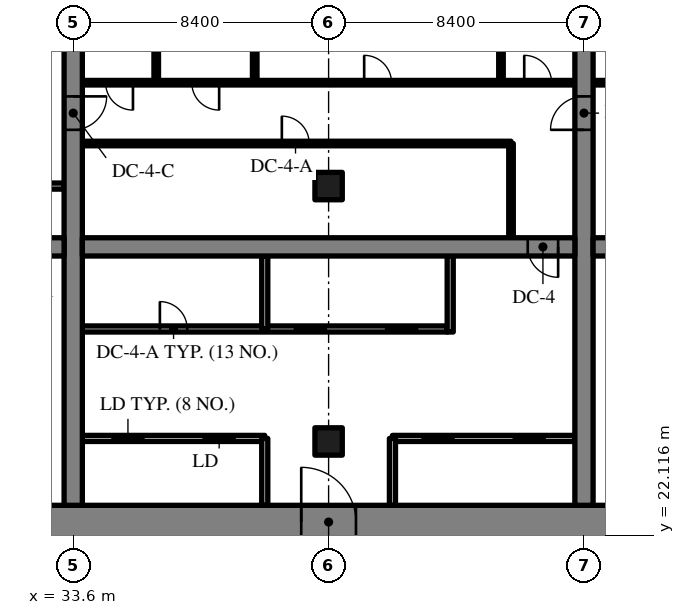
"""IFC4 building model, lengths in metres.
Left out: names, types, materials, properties, quantities, classifications, styles, units other than length and angle.
Written with IfcOpenShell. Run it as: python <this file> out.ifc"""

import sys

from ifc_helpers import new_model, si_unit, direction, frame, frame_2d, origin, origin_2d, place, context, subcontext, project, spatial, rectangle, extrude, source, transform, mapped, element, fill, save


model = new_model("IFC4")
c1 = context("Model", 3, precision=1e-05, world=origin(), true_north=direction((0.0, 1.0)))
c2 = subcontext(c1, "Body", "Model", "MODEL_VIEW")
j1 = project(units=[si_unit("LENGTHUNIT", "METRE"), si_unit("PLANEANGLEUNIT", "RADIAN")], contexts=[c1])
p1 = place(None, origin())
s1 = spatial("IfcSite", under=j1, at=p1, CompositionType="ELEMENT")
p2 = place(p1, origin())
s2 = spatial("IfcBuilding", under=s1, at=p2, CompositionType="ELEMENT")
p3 = place(p2, frame((0.0, 0.0, -9.0)))
s3 = spatial("IfcBuildingStorey", under=s2, at=p3, CompositionType="ELEMENT", Elevation=-9.0)
m1 = source(origin(), c2, "Body", "SweptSolid", [
    extrude(rectangle(XDim=50.4, YDim=1.1, at=frame_2d((25.2, 0.0))), origin(), (0.0, 0.0, 1.0), 4.22),
])
p4 = place(p3, frame((25.2, 22.55, 0.0), z_axis=(0.0, 0.0, 1.0), x_axis=(1.0, 0.0, 0.0)))
e1 = element("IfcWall", 1, at=p4, inside=s3, PredefinedType="SHEAR", context=c2, shape_type="MappedRepresentation", body=[
    mapped(m1, transform((0.0, 0.0, 0.0), scale=1.0)),
])
m2 = source(origin(), c2, "Body", "SweptSolid", [
    extrude(rectangle(XDim=1.8, YDim=2.1, at=frame_2d((0.9, 1.05))), frame((0.0, 0.56, 0.0), z_axis=(0.0, -1.0, 0.0), x_axis=(1.0, 0.0, 0.0)), (0.0, 0.0, 1.0), 1.12),
])
p5 = place(p4, frame((15.9, 0.0, 0.0)))
e2 = element("IfcOpeningElement", 2, at=p5, cuts=e1, PredefinedType="OPENING", context=c2, shape_type="MappedRepresentation", body=[
    mapped(m2, transform((0.0, 0.0, 0.0), scale=1.0)),
])
m3 = source(origin(), c2, "Body", "SweptSolid", [
    extrude(rectangle(XDim=1.2, YDim=2.1, at=frame_2d((0.6, 1.05))), frame((0.0, 0.56, 0.0), z_axis=(0.0, -1.0, 0.0), x_axis=(1.0, 0.0, 0.0)), (0.0, 0.0, 1.0), 1.12),
])
p6 = place(p4, frame((27.0, 0.0, 0.0)))
e3 = element("IfcOpeningElement", 3, at=p6, cuts=e1, PredefinedType="OPENING", context=c2, shape_type="MappedRepresentation", body=[
    mapped(m3, transform((0.0, 0.0, 0.0), scale=1.0)),
])
m4 = source(origin(), c2, "Body", "SweptSolid", [
    extrude(rectangle(XDim=0.9, YDim=2.1, at=frame_2d((0.45, 1.05))), frame((0.0, 0.56, 0.0), z_axis=(0.0, -1.0, 0.0), x_axis=(1.0, 0.0, 0.0)), (0.0, 0.0, 1.0), 1.12),
])
p7 = place(p4, frame((33.75, 0.0, 0.0)))
e4 = element("IfcOpeningElement", 4, at=p7, cuts=e1, PredefinedType="OPENING", context=c2, shape_type="MappedRepresentation", body=[
    mapped(m4, transform((0.0, 0.0, 0.0), scale=1.0)),
])
p8 = place(p4, frame((30.75, 0.0, 0.0)))
e5 = element("IfcOpeningElement", 5, at=p8, cuts=e1, PredefinedType="OPENING", context=c2, shape_type="MappedRepresentation", body=[
    mapped(m4, transform((0.0, 0.0, 0.0), scale=1.0)),
])
p9 = place(p4, frame((38.25, 0.0, 0.0)))
e6 = element("IfcOpeningElement", 6, at=p9, cuts=e1, PredefinedType="OPENING", context=c2, shape_type="MappedRepresentation", body=[
    mapped(m4, transform((0.0, 0.0, 0.0), scale=1.0)),
])
p10 = place(p4, frame((6.425, 0.0, 0.0)))
e7 = element("IfcOpeningElement", 7, at=p10, cuts=e1, PredefinedType="OPENING", context=c2, shape_type="MappedRepresentation", body=[
    mapped(m3, transform((0.0, 0.0, 0.0), scale=1.0)),
])
p11 = place(p4, frame((47.675, 0.0, 0.0)))
e8 = element("IfcOpeningElement", 8, at=p11, cuts=e1, PredefinedType="OPENING", context=c2, shape_type="MappedRepresentation", body=[
    mapped(m3, transform((0.0, 0.0, 0.0), scale=1.0)),
])
m5 = source(origin(), c2, "Body", "SweptSolid", [
    extrude(rectangle(XDim=17.8, YDim=0.6, at=frame_2d((8.9, 0.0))), origin(), (0.0, 0.0, 1.0), 4.22),
])
p12 = place(p3, frame((33.6, 23.1, 0.0), z_axis=(0.0, 0.0, 1.0), x_axis=(0.0, 1.0, 0.0)))
e9 = element("IfcWall", 9, at=p12, inside=s3, PredefinedType="SHEAR", context=c2, shape_type="MappedRepresentation", body=[
    mapped(m5, transform((0.0, 0.0, 0.0), scale=1.0)),
])
m6 = source(origin(), c2, "Body", "SweptSolid", [
    extrude(rectangle(XDim=1.1, YDim=2.1, at=frame_2d((0.55, 1.05))), frame((0.0, 0.31, 0.0), z_axis=(0.0, -1.0, 0.0), x_axis=(1.0, 0.0, 0.0)), (0.0, 0.0, 1.0), 0.62),
])
p13 = place(p12, frame((12.35, 0.0, 0.0)))
e10 = element("IfcOpeningElement", 10, at=p13, cuts=e9, PredefinedType="OPENING", context=c2, shape_type="MappedRepresentation", body=[
    mapped(m6, transform((0.0, 0.0, 0.0), scale=1.0)),
])
p14 = place(p3, frame((50.4, 23.1, 0.0), z_axis=(0.0, 0.0, 1.0), x_axis=(0.0, 1.0, 0.0)))
e11 = element("IfcWall", 11, at=p14, inside=s3, PredefinedType="SHEAR", context=c2, shape_type="MappedRepresentation", body=[
    mapped(m5, transform((0.0, 0.0, 0.0), scale=1.0)),
])
p15 = place(p14, frame((12.35, 0.0, 0.0)))
e12 = element("IfcOpeningElement", 12, at=p15, cuts=e11, PredefinedType="OPENING", context=c2, shape_type="MappedRepresentation", body=[
    mapped(m6, transform((0.0, 0.0, 0.0), scale=1.0)),
])
m7 = source(origin(), c2, "Body", "SweptSolid", [
    extrude(rectangle(XDim=7.0, YDim=0.6, at=frame_2d((3.5, 0.0))), origin(), (0.0, 0.0, 1.0), 4.22),
])
p16 = place(p3, frame((26.3, 31.6, 0.0), z_axis=(0.0, 0.0, 1.0), x_axis=(1.0, 0.0, 0.0)))
e13 = element("IfcWall", 13, at=p16, inside=s3, PredefinedType="SHEAR", context=c2, shape_type="MappedRepresentation", body=[
    mapped(m7, transform((0.0, 0.0, 0.0), scale=1.0)),
])
p17 = place(p16, frame((5.375, 0.0, 0.0)))
e14 = element("IfcOpeningElement", 14, at=p17, cuts=e13, PredefinedType="OPENING", context=c2, shape_type="MappedRepresentation", body=[
    mapped(m6, transform((0.0, 0.0, 0.0), scale=1.0)),
])
m8 = source(origin(), c2, "Body", "SweptSolid", [
    extrude(rectangle(XDim=16.2, YDim=0.6, at=frame_2d((8.1, 0.0))), origin(), (0.0, 0.0, 1.0), 4.22),
])
p18 = place(p3, frame((33.9, 31.6, 0.0), z_axis=(0.0, 0.0, 1.0), x_axis=(1.0, 0.0, 0.0)))
e15 = element("IfcWall", 15, at=p18, inside=s3, PredefinedType="SHEAR", context=c2, shape_type="MappedRepresentation", body=[
    mapped(m8, transform((0.0, 0.0, 0.0), scale=1.0)),
])
m9 = source(origin(), c2, "Body", "SweptSolid", [
    extrude(rectangle(XDim=1.0, YDim=2.1, at=frame_2d((0.5, 1.05))), frame((0.0, 0.31, 0.0), z_axis=(0.0, -1.0, 0.0), x_axis=(1.0, 0.0, 0.0)), (0.0, 0.0, 1.0), 0.62),
])
p19 = place(p18, frame((14.65, 0.0, 0.0)))
e16 = element("IfcOpeningElement", 16, at=p19, cuts=e15, PredefinedType="OPENING", context=c2, shape_type="MappedRepresentation", body=[
    mapped(m9, transform((0.0, 0.0, 0.0), scale=1.0)),
])
m10 = source(origin(), c2, "Body", "SweptSolid", [
    extrude(rectangle(XDim=16.2, YDim=0.6, at=frame_2d((8.1, 0.0))), origin(), (0.0, 0.0, 1.0), 4.22),
])
p20 = place(p3, frame((50.7, 31.6, 0.0), z_axis=(0.0, 0.0, 1.0), x_axis=(1.0, 0.0, 0.0)))
e17 = element("IfcWall", 17, at=p20, inside=s3, PredefinedType="SHEAR", context=c2, shape_type="MappedRepresentation", body=[
    mapped(m10, transform((0.0, 0.0, 0.0), scale=1.0)),
])
p21 = place(p20, frame((0.55, 0.0, 0.0)))
e18 = element("IfcOpeningElement", 18, at=p21, cuts=e17, PredefinedType="OPENING", context=c2, shape_type="MappedRepresentation", body=[
    mapped(m9, transform((0.0, 0.0, 0.0), scale=1.0)),
])
m11 = source(origin(), c2, "Body", "SweptSolid", [
    extrude(rectangle(XDim=0.9, YDim=0.9, at=origin_2d()), origin(), (0.0, 0.0, 1.0), 4.22),
])
for number, where, z_axis, x_axis in (
    (19, (42.0, 25.2, 0.0), (0.0, 0.0, 1.0), (1.0, 0.0, 0.0)),
    (20, (42.0, 33.6, 0.0), (0.0, 0.0, 1.0), (1.0, 0.0, 0.0)),
):
    element("IfcColumn", number, at=place(p3, frame(where, z_axis=z_axis, x_axis=x_axis)), inside=s3, PredefinedType="COLUMN", context=c2, shape_type="MappedRepresentation", body=[
        mapped(m11, transform((0.0, 0.0, 0.0), scale=1.0)),
    ])
m12 = source(origin(), c2, "Body", "SweptSolid", [
    extrude(rectangle(XDim=6.0, YDim=0.2, at=frame_2d((3.0, 0.0))), origin(), (0.0, 0.0, 1.0), 4.22),
])
p22 = place(p3, frame((33.9, 25.3, 0.0), z_axis=(0.0, 0.0, 1.0), x_axis=(1.0, 0.0, 0.0)))
e21 = element("IfcWall", 21, at=p22, inside=s3, PredefinedType="SOLIDWALL", context=c2, shape_type="MappedRepresentation", body=[
    mapped(m12, transform((0.0, 0.0, 0.0), scale=1.0)),
])
m13 = source(origin(), c2, "Body", "SweptSolid", [
    extrude(rectangle(XDim=1.1, YDim=2.1, at=frame_2d((0.55, 1.05))), frame((0.0, 0.11, 0.0), z_axis=(0.0, -1.0, 0.0), x_axis=(1.0, 0.0, 0.0)), (0.0, 0.0, 1.0), 0.22),
])
p23 = place(p22, frame((0.95, 0.0, 0.0)))
e22 = element("IfcOpeningElement", 22, at=p23, cuts=e21, PredefinedType="OPENING", context=c2, shape_type="MappedRepresentation", body=[
    mapped(m13, transform((0.0, 0.0, 0.0), scale=1.0)),
])
p24 = place(p22, frame((3.95, 0.0, 0.0)))
e23 = element("IfcOpeningElement", 23, at=p24, cuts=e21, PredefinedType="OPENING", context=c2, shape_type="MappedRepresentation", body=[
    mapped(m13, transform((0.0, 0.0, 0.0), scale=1.0)),
])
p25 = place(p3, frame((44.1, 25.3, 0.0), z_axis=(0.0, 0.0, 1.0), x_axis=(1.0, 0.0, 0.0)))
e24 = element("IfcWall", 24, at=p25, inside=s3, PredefinedType="SOLIDWALL", context=c2, shape_type="MappedRepresentation", body=[
    mapped(m12, transform((0.0, 0.0, 0.0), scale=1.0)),
])
p26 = place(p25, frame((0.95, 0.0, 0.0)))
e25 = element("IfcOpeningElement", 25, at=p26, cuts=e24, PredefinedType="OPENING", context=c2, shape_type="MappedRepresentation", body=[
    mapped(m13, transform((0.0, 0.0, 0.0), scale=1.0)),
])
p27 = place(p25, frame((3.95, 0.0, 0.0)))
e26 = element("IfcOpeningElement", 26, at=p27, cuts=e24, PredefinedType="OPENING", context=c2, shape_type="MappedRepresentation", body=[
    mapped(m13, transform((0.0, 0.0, 0.0), scale=1.0)),
])
m14 = source(origin(), c2, "Body", "SweptSolid", [
    extrude(rectangle(XDim=12.0, YDim=0.2, at=frame_2d((6.0, 0.0))), origin(), (0.0, 0.0, 1.0), 4.22),
])
p28 = place(p3, frame((33.9, 28.9, 0.0), z_axis=(0.0, 0.0, 1.0), x_axis=(1.0, 0.0, 0.0)))
e27 = element("IfcWall", 27, at=p28, inside=s3, PredefinedType="SOLIDWALL", context=c2, shape_type="MappedRepresentation", body=[
    mapped(m14, transform((0.0, 0.0, 0.0), scale=1.0)),
])
p29 = place(p28, frame((6.95, 0.0, 0.0)))
e28 = element("IfcOpeningElement", 28, at=p29, cuts=e27, PredefinedType="OPENING", context=c2, shape_type="MappedRepresentation", body=[
    mapped(m13, transform((0.0, 0.0, 0.0), scale=1.0)),
])
p30 = place(p28, frame((9.95, 0.0, 0.0)))
e29 = element("IfcOpeningElement", 29, at=p30, cuts=e27, PredefinedType="OPENING", context=c2, shape_type="MappedRepresentation", body=[
    mapped(m13, transform((0.0, 0.0, 0.0), scale=1.0)),
])
m15 = source(origin(), c2, "Body", "SweptSolid", [
    extrude(rectangle(XDim=0.9, YDim=2.1, at=frame_2d((0.45, 1.05))), frame((0.0, 0.11, 0.0), z_axis=(0.0, -1.0, 0.0), x_axis=(1.0, 0.0, 0.0)), (0.0, 0.0, 1.0), 0.22),
])
p31 = place(p28, frame((2.55, 0.0, 0.0)))
e30 = element("IfcOpeningElement", 30, at=p31, cuts=e27, PredefinedType="OPENING", context=c2, shape_type="MappedRepresentation", body=[
    mapped(m15, transform((0.0, 0.0, 0.0), scale=1.0)),
])
m16 = source(origin(), c2, "Body", "SweptSolid", [
    extrude(rectangle(XDim=2.2, YDim=0.2, at=frame_2d((1.1, 0.0))), origin(), (0.0, 0.0, 1.0), 4.22),
])
for number, where, z_axis, x_axis in (
    (31, (39.9, 23.1, 0.0), (0.0, 0.0, 1.0), (0.0, 1.0, 0.0)),
    (32, (44.1, 23.1, 0.0), (0.0, 0.0, 1.0), (0.0, 1.0, 0.0)),
):
    element("IfcWall", number, at=place(p3, frame(where, z_axis=z_axis, x_axis=x_axis)), inside=s3, PredefinedType="SOLIDWALL", context=c2, shape_type="MappedRepresentation", body=[
        mapped(m16, transform((0.0, 0.0, 0.0), scale=1.0)),
    ])
m17 = source(origin(), c2, "Body", "SweptSolid", [
    extrude(rectangle(XDim=2.5, YDim=0.2, at=frame_2d((1.25, 0.0))), origin(), (0.0, 0.0, 1.0), 4.22),
])
p32 = place(p3, frame((46.0, 28.8, 0.0), z_axis=(0.0, 0.0, 1.0), x_axis=(0.0, 1.0, 0.0)))
e33 = element("IfcWall", 33, at=p32, inside=s3, PredefinedType="SOLIDWALL", context=c2, shape_type="MappedRepresentation", body=[
    mapped(m17, transform((0.0, 0.0, 0.0), scale=1.0)),
])
m18 = source(origin(), c2, "Body", "SweptSolid", [
    extrude(rectangle(XDim=2.4, YDim=0.2, at=frame_2d((1.2, 0.0))), origin(), (0.0, 0.0, 1.0), 4.22),
])
p33 = place(p3, frame((39.9, 28.9, 0.0), z_axis=(0.0, 0.0, 1.0), x_axis=(0.0, 1.0, 0.0)))
e34 = element("IfcWall", 34, at=p33, inside=s3, PredefinedType="PARTITIONING", context=c2, shape_type="MappedRepresentation", body=[
    mapped(m18, transform((0.0, 0.0, 0.0), scale=1.0)),
])
m19 = source(origin(), c2, "Body", "SweptSolid", [
    extrude(rectangle(XDim=3.1, YDim=0.15, at=frame_2d((1.55, 0.0))), origin(), (0.0, 0.0, 1.0), 4.22),
])
p34 = place(p3, frame((48.0, 31.9, 0.0), z_axis=(0.0, 0.0, 1.0), x_axis=(0.0, 1.0, 0.0)))
e35 = element("IfcWall", 35, at=p34, inside=s3, PredefinedType="PARTITIONING", context=c2, shape_type="MappedRepresentation", body=[
    mapped(m19, transform((0.0, 0.0, 0.0), scale=1.0)),
])
m20 = source(origin(), c2, "Body", "SweptSolid", [
    extrude(rectangle(XDim=14.1, YDim=0.15, at=frame_2d((7.05, 0.0))), origin(), (0.0, 0.0, 1.0), 4.22),
])
p35 = place(p3, frame((33.9, 35.0, 0.0), z_axis=(0.0, 0.0, 1.0), x_axis=(1.0, 0.0, 0.0)))
e36 = element("IfcWall", 36, at=p35, inside=s3, PredefinedType="PARTITIONING", context=c2, shape_type="MappedRepresentation", body=[
    mapped(m20, transform((0.0, 0.0, 0.0), scale=1.0)),
])
m21 = source(origin(), c2, "Body", "SweptSolid", [
    extrude(rectangle(XDim=0.9, YDim=2.1, at=frame_2d((0.45, 1.05))), frame((0.0, 0.085, 0.0), z_axis=(0.0, -1.0, 0.0), x_axis=(1.0, 0.0, 0.0)), (0.0, 0.0, 1.0), 0.17),
])
p36 = place(p35, frame((6.562, 0.0, 0.0)))
e37 = element("IfcOpeningElement", 37, at=p36, cuts=e36, PredefinedType="OPENING", context=c2, shape_type="MappedRepresentation", body=[
    mapped(m21, transform((0.0, 0.0, 0.0), scale=1.0)),
])
m22 = source(origin(), c2, "Body", "SweptSolid", [
    extrude(rectangle(XDim=16.2, YDim=0.15, at=frame_2d((8.1, 0.0))), origin(), (0.0, 0.0, 1.0), 4.22),
])
p37 = place(p3, frame((33.9, 37.0, 0.0), z_axis=(0.0, 0.0, 1.0), x_axis=(1.0, 0.0, 0.0)))
e38 = element("IfcWall", 38, at=p37, inside=s3, PredefinedType="PARTITIONING", context=c2, shape_type="MappedRepresentation", body=[
    mapped(m22, transform((0.0, 0.0, 0.0), scale=1.0)),
])
p38 = place(p37, frame((0.765, 0.0, 0.0)))
e39 = element("IfcOpeningElement", 39, at=p38, cuts=e38, PredefinedType="OPENING", context=c2, shape_type="MappedRepresentation", body=[
    mapped(m21, transform((0.0, 0.0, 0.0), scale=1.0)),
])
p39 = place(p37, frame((3.6, 0.0, 0.0)))
e40 = element("IfcOpeningElement", 40, at=p39, cuts=e38, PredefinedType="OPENING", context=c2, shape_type="MappedRepresentation", body=[
    mapped(m21, transform((0.0, 0.0, 0.0), scale=1.0)),
])
p40 = place(p37, frame((9.27, 0.0, 0.0)))
e41 = element("IfcOpeningElement", 41, at=p40, cuts=e38, PredefinedType="OPENING", context=c2, shape_type="MappedRepresentation", body=[
    mapped(m21, transform((0.0, 0.0, 0.0), scale=1.0)),
])
p41 = place(p37, frame((14.535, 0.0, 0.0)))
e42 = element("IfcOpeningElement", 42, at=p41, cuts=e38, PredefinedType="OPENING", context=c2, shape_type="MappedRepresentation", body=[
    mapped(m21, transform((0.0, 0.0, 0.0), scale=1.0)),
])
m23 = source(origin(), c2, "Body", "SweptSolid", [
    extrude(rectangle(XDim=3.9, YDim=0.15, at=frame_2d((1.95, 0.0))), origin(), (0.0, 0.0, 1.0), 4.22),
])
for number, where, z_axis, x_axis in (
    (43, (36.33, 37.0, 0.0), (0.0, 0.0, 1.0), (0.0, 1.0, 0.0)),
    (44, (39.57, 37.0, 0.0), (0.0, 0.0, 1.0), (0.0, 1.0, 0.0)),
    (45, (47.67, 37.0, 0.0), (0.0, 0.0, 1.0), (0.0, 1.0, 0.0)),
):
    element("IfcWall", number, at=place(p3, frame(where, z_axis=z_axis, x_axis=x_axis)), inside=s3, PredefinedType="PARTITIONING", context=c2, shape_type="MappedRepresentation", body=[
        mapped(m23, transform((0.0, 0.0, 0.0), scale=1.0)),
    ])
m24 = source(origin(), c2, "Body", "SweptSolid", [
    extrude(rectangle(XDim=16.2, YDim=0.15, at=frame_2d((8.1, 0.0))), origin(), (0.0, 0.0, 1.0), 4.22),
])
p42 = place(p3, frame((66.9, 37.0, 0.0), z_axis=(0.0, 0.0, 1.0), x_axis=(-1.0, 0.0, 0.0)))
e46 = element("IfcWall", 46, at=p42, inside=s3, PredefinedType="PARTITIONING", context=c2, shape_type="MappedRepresentation", body=[
    mapped(m24, transform((0.0, 0.0, 0.0), scale=1.0)),
])
p43 = place(p42, frame((6.435, 0.0, 0.0)))
e47 = element("IfcOpeningElement", 47, at=p43, cuts=e46, PredefinedType="OPENING", context=c2, shape_type="MappedRepresentation", body=[
    mapped(m21, transform((0.0, 0.0, 0.0), scale=1.0)),
])
p44 = place(p42, frame((14.535, 0.0, 0.0)))
e48 = element("IfcOpeningElement", 48, at=p44, cuts=e46, PredefinedType="OPENING", context=c2, shape_type="MappedRepresentation", body=[
    mapped(m21, transform((0.0, 0.0, 0.0), scale=1.0)),
])
m25 = source(origin(), c2, "Body", "SweptSolid", [
    extrude(rectangle(XDim=2.15, YDim=0.2, at=frame_2d((1.075, 0.0))), origin(), (0.0, 0.0, 1.0), 4.22),
])
p45 = place(p3, frame((31.15, 33.6, 0.0), z_axis=(0.0, 0.0, 1.0), x_axis=(1.0, 0.0, 0.0)))
e49 = element("IfcWall", 49, at=p45, inside=s3, PredefinedType="SOLIDWALL", context=c2, shape_type="MappedRepresentation", body=[
    mapped(m25, transform((0.0, 0.0, 0.0), scale=1.0)),
])
m26 = source(origin(), c2, "Body", "SweptSolid", [
    extrude(rectangle(XDim=1.8, YDim=2.1, at=frame_2d((0.9, 1.05))), frame((0.0, 0.325, 0.0), z_axis=(0.0, -1.0, 0.0), x_axis=(1.0, 0.0, 0.0)), (0.0, 0.0, 1.0), 0.05),
])
p46 = place(p5, origin())
e50 = element("IfcDoor", 50, at=p46, inside=s3, OperationType="DOUBLE_DOOR_SINGLE_SWING", PredefinedType="DOOR", context=c2, shape_type="MappedRepresentation", body=[
    mapped(m26, transform((0.0, 0.0, 0.0), scale=1.0)),
])
fill(e2, e50)
m27 = source(origin(), c2, "Body", "SweptSolid", [
    extrude(rectangle(XDim=1.0, YDim=2.1, at=frame_2d((0.5, 1.05))), frame((0.0, 0.025, 0.0), z_axis=(0.0, -1.0, 0.0), x_axis=(1.0, 0.0, 0.0)), (0.0, 0.0, 1.0), 0.05),
])
p47 = place(p19, origin())
e51 = element("IfcDoor", 51, at=p47, inside=s3, OperationType="SINGLE_SWING_RIGHT", PredefinedType="DOOR", context=c2, shape_type="MappedRepresentation", body=[
    mapped(m27, transform((0.0, 0.0, 0.0), scale=1.0)),
])
fill(e16, e51)
m28 = source(origin(), c2, "Body", "SweptSolid", [
    extrude(rectangle(XDim=1.1, YDim=2.1, at=frame_2d((0.55, 1.05))), frame((0.0, 0.025, 0.0), z_axis=(0.0, -1.0, 0.0), x_axis=(1.0, 0.0, 0.0)), (0.0, 0.0, 1.0), 0.05),
])
p48 = place(p23, origin())
e52 = element("IfcDoor", 52, at=p48, inside=s3, OperationType="SLIDING_TO_LEFT", PredefinedType="DOOR", context=c2, shape_type="MappedRepresentation", body=[
    mapped(m28, transform((0.0, 0.0, 0.0), scale=1.0)),
])
fill(e22, e52)
p49 = place(p24, origin())
e53 = element("IfcDoor", 53, at=p49, inside=s3, OperationType="SLIDING_TO_RIGHT", PredefinedType="DOOR", context=c2, shape_type="MappedRepresentation", body=[
    mapped(m28, transform((0.0, 0.0, 0.0), scale=1.0)),
])
fill(e23, e53)
p50 = place(p26, origin())
e54 = element("IfcDoor", 54, at=p50, inside=s3, OperationType="SLIDING_TO_LEFT", PredefinedType="DOOR", context=c2, shape_type="MappedRepresentation", body=[
    mapped(m28, transform((0.0, 0.0, 0.0), scale=1.0)),
])
fill(e25, e54)
p51 = place(p27, origin())
e55 = element("IfcDoor", 55, at=p51, inside=s3, OperationType="SLIDING_TO_RIGHT", PredefinedType="DOOR", context=c2, shape_type="MappedRepresentation", body=[
    mapped(m28, transform((0.0, 0.0, 0.0), scale=1.0)),
])
fill(e26, e55)
p52 = place(p29, origin())
e56 = element("IfcDoor", 56, at=p52, inside=s3, OperationType="SLIDING_TO_LEFT", PredefinedType="DOOR", context=c2, shape_type="MappedRepresentation", body=[
    mapped(m28, transform((0.0, 0.0, 0.0), scale=1.0)),
])
fill(e28, e56)
p53 = place(p30, origin())
e57 = element("IfcDoor", 57, at=p53, inside=s3, OperationType="SLIDING_TO_RIGHT", PredefinedType="DOOR", context=c2, shape_type="MappedRepresentation", body=[
    mapped(m28, transform((0.0, 0.0, 0.0), scale=1.0)),
])
fill(e29, e57)
m29 = source(origin(), c2, "Body", "SweptSolid", [
    extrude(rectangle(XDim=0.9, YDim=2.1, at=frame_2d((0.45, 1.05))), frame((0.0, 0.025, 0.0), z_axis=(0.0, -1.0, 0.0), x_axis=(1.0, 0.0, 0.0)), (0.0, 0.0, 1.0), 0.05),
])
p54 = place(p31, origin())
e58 = element("IfcDoor", 58, at=p54, inside=s3, OperationType="SINGLE_SWING_LEFT", PredefinedType="DOOR", context=c2, shape_type="MappedRepresentation", body=[
    mapped(m29, transform((0.0, 0.0, 0.0), scale=1.0)),
])
fill(e30, e58)
p55 = place(p36, origin())
e59 = element("IfcDoor", 59, at=p55, inside=s3, OperationType="SINGLE_SWING_LEFT", PredefinedType="DOOR", context=c2, shape_type="MappedRepresentation", body=[
    mapped(m29, transform((0.0, 0.0, 0.0), scale=1.0)),
])
fill(e37, e59)
p56 = place(p38, origin())
e60 = element("IfcDoor", 60, at=p56, inside=s3, OperationType="SINGLE_SWING_RIGHT", PredefinedType="DOOR", context=c2, shape_type="MappedRepresentation", body=[
    mapped(m29, transform((0.0, 0.0, 0.0), scale=1.0)),
])
fill(e39, e60)
p57 = place(p39, origin())
e61 = element("IfcDoor", 61, at=p57, inside=s3, OperationType="SINGLE_SWING_RIGHT", PredefinedType="DOOR", context=c2, shape_type="MappedRepresentation", body=[
    mapped(m29, transform((0.0, 0.0, 0.0), scale=1.0)),
])
fill(e40, e61)
p58 = place(p40, origin())
e62 = element("IfcDoor", 62, at=p58, inside=s3, OperationType="SINGLE_SWING_LEFT", PredefinedType="DOOR", context=c2, shape_type="MappedRepresentation", body=[
    mapped(m29, transform((0.0, 0.0, 0.0), scale=1.0)),
])
fill(e41, e62)
p59 = place(p41, origin())
e63 = element("IfcDoor", 63, at=p59, inside=s3, OperationType="SINGLE_SWING_LEFT", PredefinedType="DOOR", context=c2, shape_type="MappedRepresentation", body=[
    mapped(m29, transform((0.0, 0.0, 0.0), scale=1.0)),
])
fill(e42, e63)
p60 = place(p13, origin())
e64 = element("IfcDoor", 64, at=p60, inside=s3, OperationType="SINGLE_SWING_RIGHT", PredefinedType="DOOR", context=c2, shape_type="MappedRepresentation", body=[
    mapped(m28, transform((0.0, 0.0, 0.0), scale=1.0)),
])
fill(e10, e64)
p61 = place(p15, origin())
e65 = element("IfcDoor", 65, at=p61, inside=s3, OperationType="SINGLE_SWING_LEFT", PredefinedType="DOOR", context=c2, shape_type="MappedRepresentation", body=[
    mapped(m28, transform((0.0, 0.0, 0.0), scale=1.0)),
])
fill(e12, e65)
save(model, sys.argv[1])
